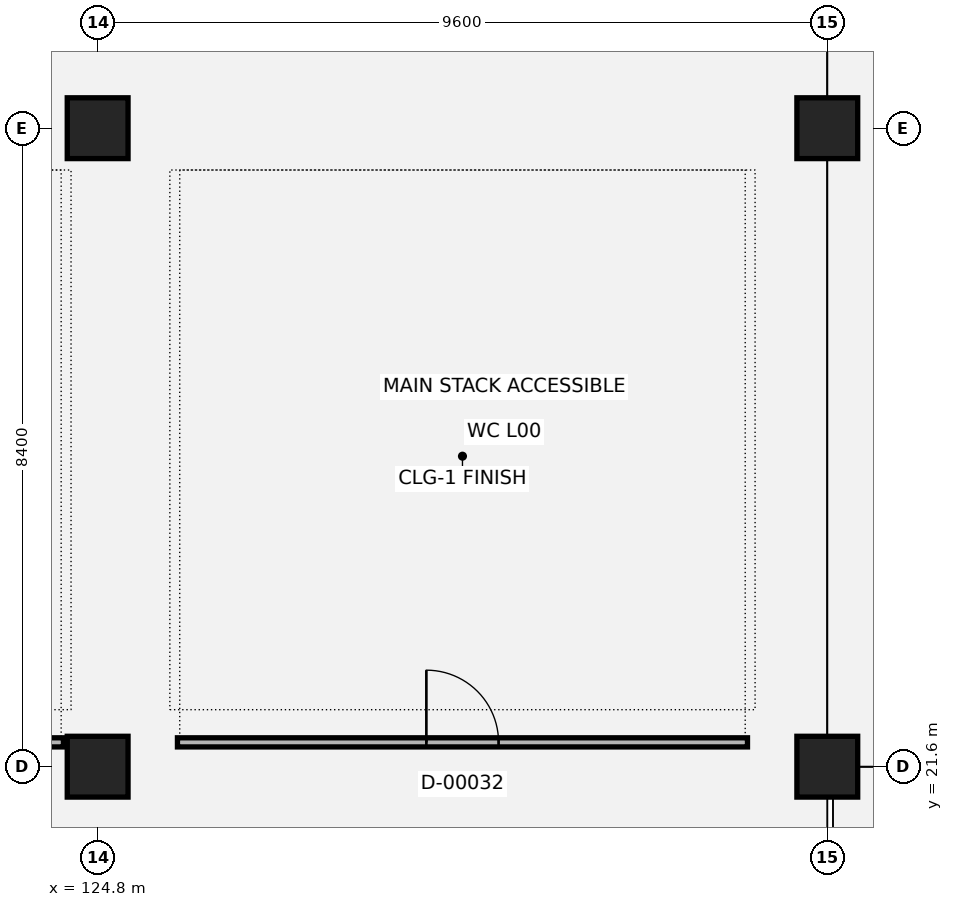
"""IFC4 building model, lengths in metres.
Left out: names, types, materials, properties, quantities, classifications, styles, units other than length and angle.
Written with IfcOpenShell. Run it as: python <this file> out.ifc"""

import sys

from ifc_helpers import new_model, si_unit, direction, frame, frame_2d, origin, origin_2d, place, context, subcontext, project, spatial, rectangle, extrude, element, fill, save


model = new_model("IFC4")
c1 = context("Model", 3, precision=1e-05, world=origin(), true_north=direction((0.0, 1.0)))
c2 = subcontext(c1, "Body", "Model", "MODEL_VIEW")
j1 = project(units=[si_unit("LENGTHUNIT", "METRE"), si_unit("PLANEANGLEUNIT", "RADIAN")], contexts=[c1])
p1 = place(None, origin())
s1 = spatial("IfcSite", under=j1, at=p1, CompositionType="ELEMENT")
p2 = place(p1, origin())
s2 = spatial("IfcBuilding", under=s1, at=p2, CompositionType="ELEMENT")
p3 = place(p2, origin())
s3 = spatial("IfcBuildingStorey", under=s2, at=p3, CompositionType="ELEMENT", Elevation=0.0)
for number, where, z_axis, x_axis in (
    (1, (124.8, 21.6, 0.0), (0.0, 0.0, 1.0), (1.0, 0.0, 0.0)),
    (2, (124.8, 30.0, 0.0), (0.0, 0.0, 1.0), (1.0, 0.0, 0.0)),
    (3, (134.4, 21.6, 0.0), (0.0, 0.0, 1.0), (1.0, 0.0, 0.0)),
    (4, (134.4, 30.0, 0.0), (0.0, 0.0, 1.0), (1.0, 0.0, 0.0)),
):
    element("IfcColumn", number, at=place(p3, frame(where, z_axis=z_axis, x_axis=x_axis)), inside=s3, PredefinedType="COLUMN", context=c2, shape_type="SweptSolid", body=[
        extrude(rectangle(XDim=0.8, YDim=0.8, at=origin_2d()), origin(), (0.0, 0.0, 1.0), 5.4),
    ])
p4 = place(p3, frame((116.05, 21.92, 0.0), z_axis=(0.0, 0.0, 1.0), x_axis=(1.0, 0.0, 0.0)))
e5 = element("IfcWall", 5, at=p4, inside=s3, PredefinedType="PARTITIONING", context=c2, shape_type="SweptSolid", body=[
    extrude(rectangle(XDim=8.3, YDim=0.12, at=frame_2d((4.15, 0.0))), origin(), (0.0, 0.0, 1.0), 4.04),
])
p5 = place(p4, frame((5.967, 0.0, 0.0)))
e6 = element("IfcOpeningElement", 6, at=p5, cuts=e5, PredefinedType="OPENING", context=c2, shape_type="SweptSolid", body=[
    extrude(rectangle(XDim=0.95, YDim=2.1, at=frame_2d((0.475, 1.05))), frame((0.0, 0.07, 0.0), z_axis=(0.0, -1.0, 0.0), x_axis=(1.0, 0.0, 0.0)), (0.0, 0.0, 1.0), 0.14),
])
p6 = place(p3, frame((125.85, 21.92, 0.0), z_axis=(0.0, 0.0, 1.0), x_axis=(1.0, 0.0, 0.0)))
e7 = element("IfcWall", 7, at=p6, inside=s3, PredefinedType="PARTITIONING", context=c2, shape_type="SweptSolid", body=[
    extrude(rectangle(XDim=7.5, YDim=0.12, at=frame_2d((3.75, 0.0))), origin(), (0.0, 0.0, 1.0), 4.04),
])
p7 = place(p6, frame((3.275, 0.0, 0.0)))
e8 = element("IfcOpeningElement", 8, at=p7, cuts=e7, PredefinedType="OPENING", context=c2, shape_type="SweptSolid", body=[
    extrude(rectangle(XDim=0.95, YDim=2.1, at=frame_2d((0.475, 1.05))), frame((0.0, 0.07, 0.0), z_axis=(0.0, -1.0, 0.0), x_axis=(1.0, 0.0, 0.0)), (0.0, 0.0, 1.0), 0.14),
])
p8 = place(p7, origin())
e9 = element("IfcDoor", 9, at=p8, inside=s3, OperationType="SINGLE_SWING_LEFT", PredefinedType="DOOR", context=c2, shape_type="SweptSolid", body=[
    extrude(rectangle(XDim=0.95, YDim=2.1, at=frame_2d((0.475, 1.05))), frame((0.0, 0.025, 0.0), z_axis=(0.0, -1.0, 0.0), x_axis=(1.0, 0.0, 0.0)), (0.0, 0.0, 1.0), 0.05),
])
fill(e8, e9)
save(model, sys.argv[1])
